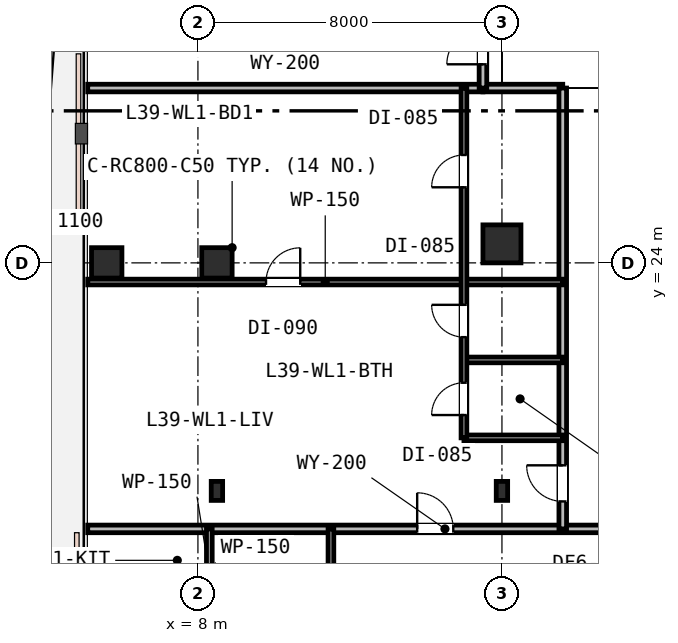
"""IFC4 building model, lengths in metres.
Left out: names, types, materials, properties, quantities, classifications, styles, units other than length and angle.
Written with IfcOpenShell. Run it as: python <this file> out.ifc"""

import sys

from ifc_helpers import new_model, si_unit, direction, frame, frame_2d, origin, origin_2d, place, context, subcontext, project, spatial, rectangle, i_section, extrude, element, fill, save


model = new_model("IFC4")
c1 = context("Model", 3, precision=1e-05, world=origin(), true_north=direction((0.0, 1.0)))
c2 = subcontext(c1, "Body", "Model", "MODEL_VIEW")
j1 = project(units=[si_unit("LENGTHUNIT", "METRE"), si_unit("PLANEANGLEUNIT", "RADIAN")], contexts=[c1])
p1 = place(None, origin())
s1 = spatial("IfcSite", under=j1, at=p1, CompositionType="ELEMENT")
p2 = place(p1, origin())
s2 = spatial("IfcBuilding", under=s1, at=p2, CompositionType="ELEMENT")
p3 = place(p2, frame((0.0, 0.0, 154.2)))
s3 = spatial("IfcBuildingStorey", under=s2, at=p3, CompositionType="ELEMENT", Elevation=154.2)
p4 = place(p3, frame((8.5, 24.0, 0.0), z_axis=(0.0, 0.0, 1.0), x_axis=(1.0, 0.0, 0.0)))
e1 = element("IfcColumn", 1, at=p4, inside=s3, PredefinedType="COLUMN", context=c2, shape_type="SweptSolid", body=[
    extrude(rectangle(XDim=0.8, YDim=0.8, at=origin_2d()), origin(), (0.0, 0.0, 1.0), 3.6),
])
p5 = place(p3, frame((16.0, 24.5, 0.0), z_axis=(0.0, 0.0, 1.0), x_axis=(1.0, 0.0, 0.0)))
e2 = element("IfcColumn", 2, at=p5, inside=s3, PredefinedType="COLUMN", context=c2, shape_type="SweptSolid", body=[
    extrude(rectangle(XDim=1.0, YDim=1.0, at=origin_2d()), origin(), (0.0, 0.0, 1.0), 3.6),
])
p6 = place(p3, frame((5.6, 24.0, 0.0), z_axis=(0.0, 0.0, 1.0), x_axis=(1.0, 0.0, 0.0)))
e3 = element("IfcColumn", 3, at=p6, inside=s3, PredefinedType="COLUMN", context=c2, shape_type="SweptSolid", body=[
    extrude(rectangle(XDim=0.8, YDim=0.8, at=origin_2d()), origin(), (0.0, 0.0, 1.0), 3.6),
])
for number, where, z_axis, x_axis in (
    (4, (8.5, 18.0, 0.0), (0.0, 0.0, 1.0), (1.0, 0.0, 0.0)),
    (5, (16.0, 18.0, 0.0), (0.0, 0.0, 1.0), (1.0, 0.0, 0.0)),
):
    element("IfcColumn", number, at=place(p3, frame(where, z_axis=z_axis, x_axis=x_axis)), inside=s3, PredefinedType="COLUMN", context=c2, shape_type="SweptSolid", body=[
        extrude(i_section(OverallWidth=0.3, OverallDepth=0.5, WebThickness=0.015, FlangeThickness=0.028, FilletRadius=0.027, at=origin_2d()), origin(), (0.0, 0.0, 1.0), 3.6),
    ])
p7 = place(p3, frame((5.1, 28.6, 0.0), z_axis=(0.0, 0.0, 1.0), x_axis=(1.0, 0.0, 0.0)))
e6 = element("IfcWall", 6, at=p7, inside=s3, PredefinedType="PARTITIONING", context=c2, shape_type="SweptSolid", body=[
    extrude(rectangle(XDim=10.4, YDim=0.2, at=frame_2d((5.2, 0.0))), origin(), (0.0, 0.0, 1.0), 2.93),
])
p8 = place(p3, frame((15.5, 28.6, 0.0), z_axis=(0.0, 0.0, 1.0), x_axis=(1.0, 0.0, 0.0)))
e7 = element("IfcWall", 7, at=p8, inside=s3, PredefinedType="PARTITIONING", context=c2, shape_type="SweptSolid", body=[
    extrude(rectangle(XDim=2.1, YDim=0.2, at=frame_2d((1.05, 0.0))), origin(), (0.0, 0.0, 1.0), 2.93),
])
p9 = place(p3, frame((15.5, 28.6, 0.0), z_axis=(0.0, 0.0, 1.0), x_axis=(0.0, 1.0, 0.0)))
e8 = element("IfcWall", 8, at=p9, inside=s3, PredefinedType="PARTITIONING", context=c2, shape_type="SweptSolid", body=[
    extrude(rectangle(XDim=14.3, YDim=0.2, at=frame_2d((7.15, 0.0))), origin(), (0.0, 0.0, 1.0), 2.93),
])
p10 = place(p9, frame((0.625, 0.0, 0.0)))
e9 = element("IfcOpeningElement", 9, at=p10, cuts=e8, PredefinedType="OPENING", context=c2, shape_type="SweptSolid", body=[
    extrude(rectangle(XDim=0.95, YDim=2.15, at=frame_2d((0.475, 1.075))), frame((0.0, 0.11, 0.0), z_axis=(0.0, -1.0, 0.0), x_axis=(1.0, 0.0, 0.0)), (0.0, 0.0, 1.0), 0.22),
])
p11 = place(p3, frame((5.1, 17.0, 0.0), z_axis=(0.0, 0.0, 1.0), x_axis=(1.0, 0.0, 0.0)))
e10 = element("IfcWall", 10, at=p11, inside=s3, PredefinedType="PARTITIONING", context=c2, shape_type="SweptSolid", body=[
    extrude(rectangle(XDim=18.8, YDim=0.2, at=frame_2d((9.4, 0.0))), origin(), (0.0, 0.0, 1.0), 2.93),
])
p12 = place(p11, frame((8.669, 0.0, 0.0)))
e11 = element("IfcOpeningElement", 11, at=p12, cuts=e10, PredefinedType="OPENING", context=c2, shape_type="SweptSolid", body=[
    extrude(rectangle(XDim=0.95, YDim=2.15, at=frame_2d((0.475, 1.075))), frame((0.0, 0.11, 0.0), z_axis=(0.0, -1.0, 0.0), x_axis=(1.0, 0.0, 0.0)), (0.0, 0.0, 1.0), 0.22),
])
p13 = place(p3, frame((17.6, 17.0, 0.0), z_axis=(0.0, 0.0, 1.0), x_axis=(0.0, 1.0, 0.0)))
e12 = element("IfcWall", 12, at=p13, inside=s3, PredefinedType="PARTITIONING", context=c2, shape_type="SweptSolid", body=[
    extrude(rectangle(XDim=11.6, YDim=0.2, at=frame_2d((5.8, 0.0))), origin(), (0.0, 0.0, 1.0), 2.93),
])
p14 = place(p13, frame((0.723, 0.0, 0.0)))
e13 = element("IfcOpeningElement", 13, at=p14, cuts=e12, PredefinedType="OPENING", context=c2, shape_type="SweptSolid", body=[
    extrude(rectangle(XDim=0.95, YDim=2.15, at=frame_2d((0.475, 1.075))), frame((0.0, 0.11, 0.0), z_axis=(0.0, -1.0, 0.0), x_axis=(1.0, 0.0, 0.0)), (0.0, 0.0, 1.0), 0.22),
])
for number, where, z_axis, x_axis in (
    (14, (15.0, 19.396, 0.0), (0.0, 0.0, 1.0), (1.0, 0.0, 0.0)),
    (15, (15.0, 21.446, 0.0), (0.0, 0.0, 1.0), (1.0, 0.0, 0.0)),
):
    element("IfcWall", number, at=place(p3, frame(where, z_axis=z_axis, x_axis=x_axis)), inside=s3, PredefinedType="PARTITIONING", context=c2, shape_type="SweptSolid", body=[
        extrude(rectangle(XDim=2.6, YDim=0.15, at=frame_2d((1.3, 0.0))), origin(), (0.0, 0.0, 1.0), 2.93),
    ])
p15 = place(p3, frame((5.1, 23.496, 0.0), z_axis=(0.0, 0.0, 1.0), x_axis=(1.0, 0.0, 0.0)))
e16 = element("IfcWall", 16, at=p15, inside=s3, PredefinedType="PARTITIONING", context=c2, shape_type="SweptSolid", body=[
    extrude(rectangle(XDim=12.5, YDim=0.15, at=frame_2d((6.25, 0.0))), origin(), (0.0, 0.0, 1.0), 2.93),
])
p16 = place(p15, frame((4.692, 0.0, 0.0)))
e17 = element("IfcOpeningElement", 17, at=p16, cuts=e16, PredefinedType="OPENING", context=c2, shape_type="SweptSolid", body=[
    extrude(rectangle(XDim=0.9, YDim=2.15, at=frame_2d((0.45, 1.075))), frame((0.0, 0.085, 0.0), z_axis=(0.0, -1.0, 0.0), x_axis=(1.0, 0.0, 0.0)), (0.0, 0.0, 1.0), 0.17),
])
p17 = place(p3, frame((15.0, 19.396, 0.0), z_axis=(0.0, 0.0, 1.0), x_axis=(0.0, 1.0, 0.0)))
e18 = element("IfcWall", 18, at=p17, inside=s3, PredefinedType="PARTITIONING", context=c2, shape_type="SweptSolid", body=[
    extrude(rectangle(XDim=9.204, YDim=0.15, at=frame_2d((4.602, 0.0))), origin(), (0.0, 0.0, 1.0), 2.93),
])
p18 = place(p17, frame((0.6, 0.0, 0.0)))
e19 = element("IfcOpeningElement", 19, at=p18, cuts=e18, PredefinedType="OPENING", context=c2, shape_type="SweptSolid", body=[
    extrude(rectangle(XDim=0.85, YDim=2.15, at=frame_2d((0.425, 1.075))), frame((0.0, 0.085, 0.0), z_axis=(0.0, -1.0, 0.0), x_axis=(1.0, 0.0, 0.0)), (0.0, 0.0, 1.0), 0.17),
])
p19 = place(p17, frame((2.65, 0.0, 0.0)))
e20 = element("IfcOpeningElement", 20, at=p19, cuts=e18, PredefinedType="OPENING", context=c2, shape_type="SweptSolid", body=[
    extrude(rectangle(XDim=0.85, YDim=2.15, at=frame_2d((0.425, 1.075))), frame((0.0, 0.085, 0.0), z_axis=(0.0, -1.0, 0.0), x_axis=(1.0, 0.0, 0.0)), (0.0, 0.0, 1.0), 0.17),
])
p20 = place(p17, frame((6.593, 0.0, 0.0)))
e21 = element("IfcOpeningElement", 21, at=p20, cuts=e18, PredefinedType="OPENING", context=c2, shape_type="SweptSolid", body=[
    extrude(rectangle(XDim=0.85, YDim=2.15, at=frame_2d((0.425, 1.075))), frame((0.0, 0.085, 0.0), z_axis=(0.0, -1.0, 0.0), x_axis=(1.0, 0.0, 0.0)), (0.0, 0.0, 1.0), 0.17),
])
p21 = place(p3, frame((11.5, 14.65, 0.0), z_axis=(0.0, 0.0, 1.0), x_axis=(0.0, 1.0, 0.0)))
e22 = element("IfcWall", 22, at=p21, inside=s3, PredefinedType="PARTITIONING", context=c2, shape_type="SweptSolid", body=[
    extrude(rectangle(XDim=2.35, YDim=0.15, at=frame_2d((1.175, 0.0))), origin(), (0.0, 0.0, 1.0), 2.96),
])
p22 = place(p3, frame((8.3, 14.65, 0.0), z_axis=(0.0, 0.0, 1.0), x_axis=(0.0, 1.0, 0.0)))
e23 = element("IfcWall", 23, at=p22, inside=s3, PredefinedType="PARTITIONING", context=c2, shape_type="SweptSolid", body=[
    extrude(rectangle(XDim=2.35, YDim=0.15, at=frame_2d((1.175, 0.0))), origin(), (0.0, 0.0, 1.0), 2.93),
])
p23 = place(p10, origin())
e24 = element("IfcDoor", 24, at=p23, inside=s3, OperationType="SINGLE_SWING_LEFT", PredefinedType="DOOR", context=c2, shape_type="SweptSolid", body=[
    extrude(rectangle(XDim=0.95, YDim=2.15, at=frame_2d((0.475, 1.075))), frame((0.0, 0.025, 0.0), z_axis=(0.0, -1.0, 0.0), x_axis=(1.0, 0.0, 0.0)), (0.0, 0.0, 1.0), 0.05),
])
fill(e9, e24)
p24 = place(p14, origin())
e25 = element("IfcDoor", 25, at=p24, inside=s3, OperationType="SINGLE_SWING_RIGHT", PredefinedType="DOOR", context=c2, shape_type="SweptSolid", body=[
    extrude(rectangle(XDim=0.95, YDim=2.15, at=frame_2d((0.475, 1.075))), frame((0.0, 0.025, 0.0), z_axis=(0.0, -1.0, 0.0), x_axis=(1.0, 0.0, 0.0)), (0.0, 0.0, 1.0), 0.05),
])
fill(e13, e25)
p25 = place(p18, origin())
e26 = element("IfcDoor", 26, at=p25, inside=s3, OperationType="SINGLE_SWING_LEFT", PredefinedType="DOOR", context=c2, shape_type="SweptSolid", body=[
    extrude(rectangle(XDim=0.85, YDim=2.15, at=frame_2d((0.425, 1.075))), frame((0.0, 0.025, 0.0), z_axis=(0.0, -1.0, 0.0), x_axis=(1.0, 0.0, 0.0)), (0.0, 0.0, 1.0), 0.05),
])
fill(e19, e26)
p26 = place(p19, origin())
e27 = element("IfcDoor", 27, at=p26, inside=s3, OperationType="SINGLE_SWING_RIGHT", PredefinedType="DOOR", context=c2, shape_type="SweptSolid", body=[
    extrude(rectangle(XDim=0.85, YDim=2.15, at=frame_2d((0.425, 1.075))), frame((0.0, 0.025, 0.0), z_axis=(0.0, -1.0, 0.0), x_axis=(1.0, 0.0, 0.0)), (0.0, 0.0, 1.0), 0.05),
])
fill(e20, e27)
p27 = place(p20, origin())
e28 = element("IfcDoor", 28, at=p27, inside=s3, OperationType="SINGLE_SWING_LEFT", PredefinedType="DOOR", context=c2, shape_type="SweptSolid", body=[
    extrude(rectangle(XDim=0.85, YDim=2.15, at=frame_2d((0.425, 1.075))), frame((0.0, 0.025, 0.0), z_axis=(0.0, -1.0, 0.0), x_axis=(1.0, 0.0, 0.0)), (0.0, 0.0, 1.0), 0.05),
])
fill(e21, e28)
p28 = place(p16, origin())
e29 = element("IfcDoor", 29, at=p28, inside=s3, OperationType="SINGLE_SWING_RIGHT", PredefinedType="DOOR", context=c2, shape_type="SweptSolid", body=[
    extrude(rectangle(XDim=0.9, YDim=2.15, at=frame_2d((0.45, 1.075))), frame((0.0, 0.025, 0.0), z_axis=(0.0, -1.0, 0.0), x_axis=(1.0, 0.0, 0.0)), (0.0, 0.0, 1.0), 0.05),
])
fill(e17, e29)
p29 = place(p12, origin())
e30 = element("IfcDoor", 30, at=p29, inside=s3, OperationType="SINGLE_SWING_LEFT", PredefinedType="DOOR", context=c2, shape_type="SweptSolid", body=[
    extrude(rectangle(XDim=0.95, YDim=2.15, at=frame_2d((0.475, 1.075))), frame((0.0, 0.025, 0.0), z_axis=(0.0, -1.0, 0.0), x_axis=(1.0, 0.0, 0.0)), (0.0, 0.0, 1.0), 0.05),
])
fill(e11, e30)
save(model, sys.argv[1])
